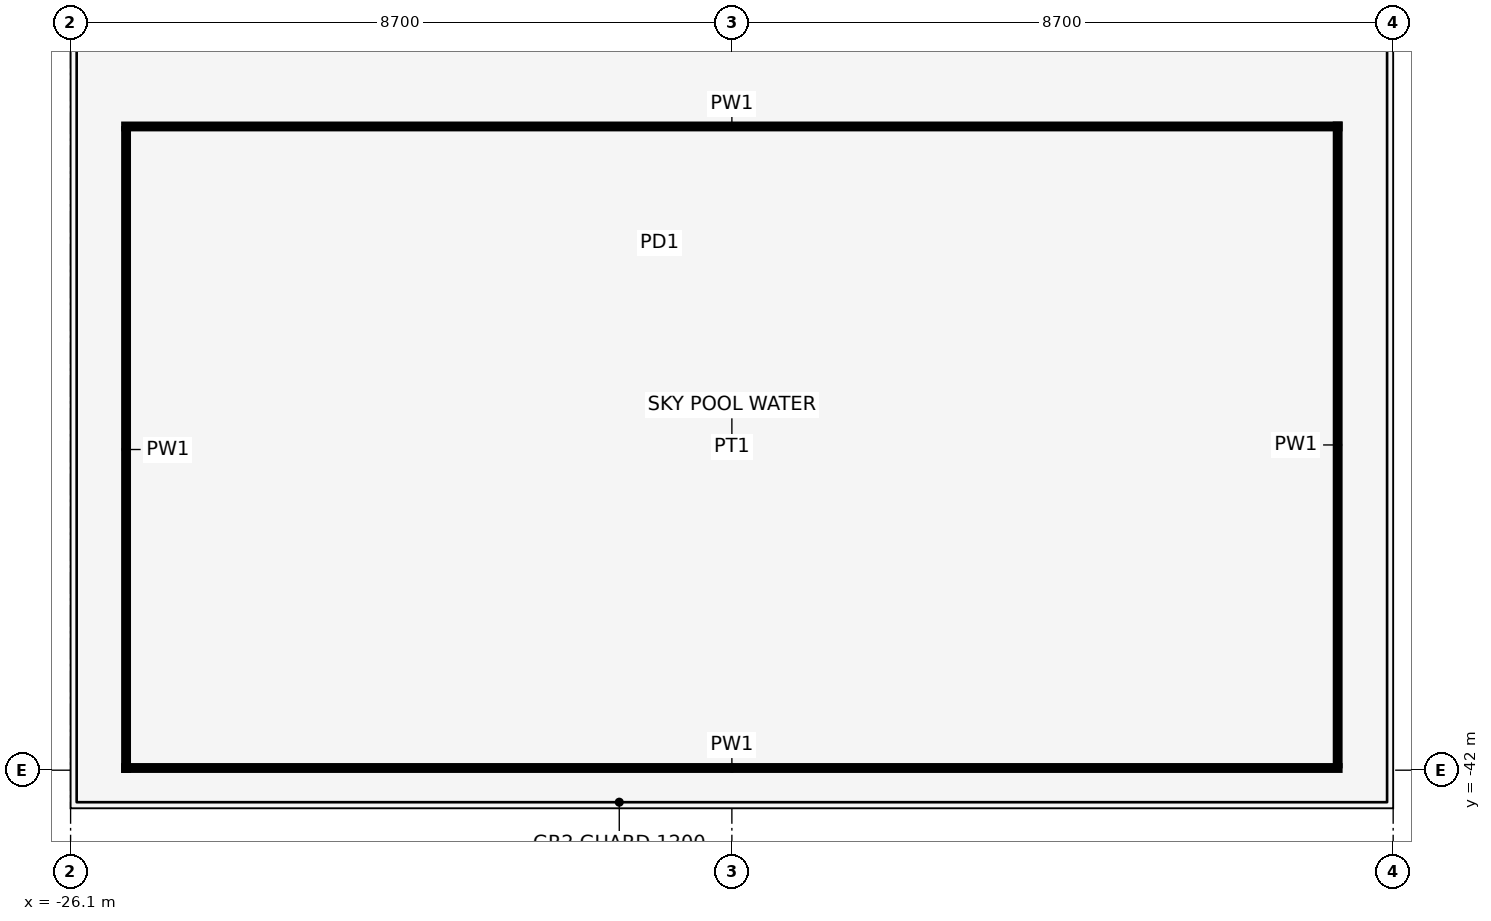
"""IFC4 building model, lengths in metres.
Left out: names, types, materials, properties, quantities, classifications, styles, units other than length and angle.
Written with IfcOpenShell. Run it as: python <this file> out.ifc"""

import sys

from ifc_helpers import new_model, si_unit, direction, frame, frame_2d, origin, place, context, subcontext, project, spatial, rectangle, extrude, element, save


model = new_model("IFC4")
c1 = context("Model", 3, precision=1e-05, world=origin(), true_north=direction((0.0, 1.0)))
c2 = subcontext(c1, "Body", "Model", "MODEL_VIEW")
j1 = project(units=[si_unit("LENGTHUNIT", "METRE"), si_unit("PLANEANGLEUNIT", "RADIAN")], contexts=[c1])
p1 = place(None, origin())
s1 = spatial("IfcSite", under=j1, at=p1, CompositionType="ELEMENT")
p2 = place(p1, origin())
s2 = spatial("IfcBuilding", under=s1, at=p2, CompositionType="ELEMENT")
p3 = place(p2, frame((0.0, 0.0, 293.0)))
s3 = spatial("IfcBuildingStorey", under=s2, at=p3, CompositionType="ELEMENT", Elevation=293.0)
p4 = place(p3, frame((-25.4, -41.971, 0.3), z_axis=(0.0, 0.0, 1.0), x_axis=(1.0, 0.0, 0.0)))
e1 = element("IfcWall", 1, at=p4, inside=s3, PredefinedType="STANDARD", context=c2, shape_type="SweptSolid", body=[
    extrude(rectangle(XDim=16.0, YDim=0.06, at=frame_2d((8.0, 0.0))), origin(), (0.0, 0.0, 1.0), 1.8),
])
p5 = place(p3, frame((-9.43, -41.941, 0.3), z_axis=(0.0, 0.0, 1.0), x_axis=(0.0, 1.0, 0.0)))
e2 = element("IfcWall", 2, at=p5, inside=s3, PredefinedType="STANDARD", context=c2, shape_type="SweptSolid", body=[
    extrude(rectangle(XDim=8.44, YDim=0.06, at=frame_2d((4.22, 0.0))), origin(), (0.0, 0.0, 1.0), 1.8),
])
p6 = place(p3, frame((-9.4, -33.531, 0.3), z_axis=(0.0, 0.0, 1.0), x_axis=(-1.0, 0.0, 0.0)))
e3 = element("IfcWall", 3, at=p6, inside=s3, PredefinedType="STANDARD", context=c2, shape_type="SweptSolid", body=[
    extrude(rectangle(XDim=16.0, YDim=0.06, at=frame_2d((8.0, 0.0))), origin(), (0.0, 0.0, 1.0), 1.8),
])
p7 = place(p3, frame((-25.37, -33.561, 0.3), z_axis=(0.0, 0.0, 1.0), x_axis=(0.0, -1.0, 0.0)))
e4 = element("IfcWall", 4, at=p7, inside=s3, PredefinedType="STANDARD", context=c2, shape_type="SweptSolid", body=[
    extrude(rectangle(XDim=8.44, YDim=0.06, at=frame_2d((4.22, 0.0))), origin(), (0.0, 0.0, 1.0), 1.8),
])
save(model, sys.argv[1])
